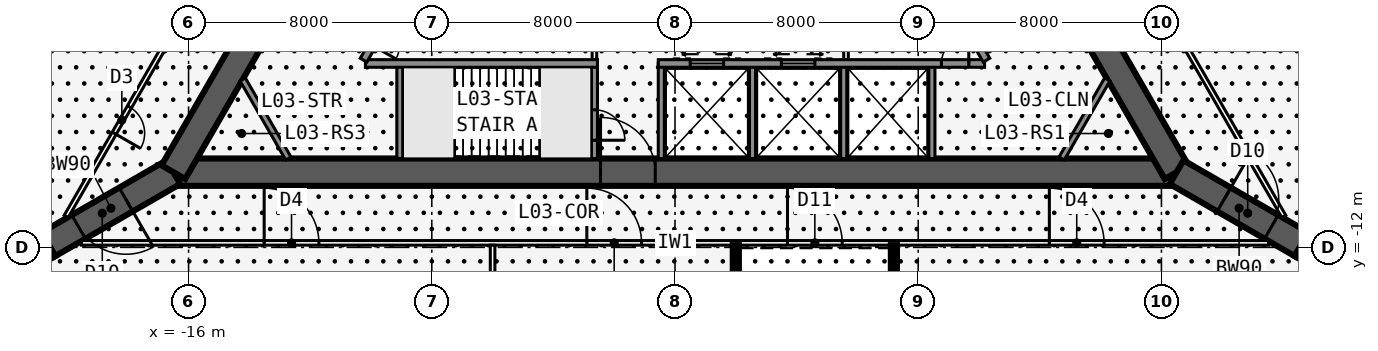
"""IFC4 building model, lengths in metres.
Left out: names, types, materials, properties, quantities, classifications, styles, units other than length and angle.
Written with IfcOpenShell. Run it as: python <this file> out.ifc"""

import sys

from ifc_helpers import new_model, si_unit, direction, frame, frame_2d, origin, place, context, subcontext, project, spatial, rectangle, extrude, element, fill, save


model = new_model("IFC4")
c1 = context("Model", 3, precision=1e-05, world=origin(), true_north=direction((0.0, 1.0)))
c2 = subcontext(c1, "Body", "Model", "MODEL_VIEW")
j1 = project(units=[si_unit("LENGTHUNIT", "METRE"), si_unit("PLANEANGLEUNIT", "RADIAN")], contexts=[c1])
p1 = place(None, origin())
s1 = spatial("IfcSite", under=j1, at=p1, CompositionType="ELEMENT")
p2 = place(p1, origin())
s2 = spatial("IfcBuilding", under=s1, at=p2, CompositionType="ELEMENT")
p3 = place(p2, frame((0.0, 0.0, 17.5)))
s3 = spatial("IfcBuildingStorey", under=s2, at=p3, CompositionType="ELEMENT", Elevation=17.5)
p4 = place(p3, frame((-16.5, -9.526, 0.0), z_axis=(0.0, 0.0, 1.0), x_axis=(1.0, 0.0, 0.0)))
e1 = element("IfcWall", 1, at=p4, inside=s3, PredefinedType="SHEAR", context=c2, shape_type="SweptSolid", body=[
    extrude(rectangle(XDim=33.0, YDim=0.9, at=frame_2d((16.5, 0.0))), origin(), (0.0, 0.0, 1.0), 5.0),
])
p5 = place(p4, frame((14.05, 0.0, 0.0)))
e2 = element("IfcOpeningElement", 2, at=p5, cuts=e1, PredefinedType="OPENING", context=c2, shape_type="SweptSolid", body=[
    extrude(rectangle(XDim=1.8, YDim=2.13, at=frame_2d((0.9, 1.065))), frame((0.0, 0.46, 0.0), z_axis=(0.0, -1.0, 0.0), x_axis=(1.0, 0.0, 0.0)), (0.0, 0.0, 1.0), 0.92),
])
p6 = place(p3, frame((-10.183, -5.951, 0.0), z_axis=(0.0, 0.0, 1.0), x_axis=(1.0, 0.0, 0.0)))
e3 = element("IfcWall", 3, at=p6, inside=s3, PredefinedType="SOLIDWALL", context=c2, shape_type="SweptSolid", body=[
    extrude(rectangle(XDim=7.633, YDim=0.25, at=frame_2d((3.816, 0.0))), origin(), (0.0, 0.0, 1.0), 4.75),
])
p7 = place(p3, frame((-0.55, -5.951, 0.0), z_axis=(0.0, 0.0, 1.0), x_axis=(1.0, 0.0, 0.0)))
e4 = element("IfcWall", 4, at=p7, inside=s3, PredefinedType="SOLIDWALL", context=c2, shape_type="SweptSolid", body=[
    extrude(rectangle(XDim=10.733, YDim=0.25, at=frame_2d((5.366, 0.0))), origin(), (0.0, 0.0, 1.0), 4.75),
])
p8 = place(p7, frame((9.314, 0.0, 0.0)))
e5 = element("IfcOpeningElement", 5, at=p8, cuts=e4, PredefinedType="OPENING", context=c2, shape_type="SweptSolid", body=[
    extrude(rectangle(XDim=0.9, YDim=2.13, at=frame_2d((0.45, 1.065))), frame((0.0, 0.135, 0.0), z_axis=(0.0, -1.0, 0.0), x_axis=(1.0, 0.0, 0.0)), (0.0, 0.0, 1.0), 0.27),
])
p9 = place(p7, frame((1.05, 0.0, 0.0)))
e6 = element("IfcOpeningElement", 6, at=p9, cuts=e4, PredefinedType="OPENING", context=c2, shape_type="SweptSolid", body=[
    extrude(rectangle(XDim=1.1, YDim=2.13, at=frame_2d((0.55, 1.065))), frame((0.0, 0.135, 0.0), z_axis=(0.0, -1.0, 0.0), x_axis=(1.0, 0.0, 0.0)), (0.0, 0.0, 1.0), 0.27),
])
p10 = place(p7, frame((4.05, 0.0, 0.0)))
e7 = element("IfcOpeningElement", 7, at=p10, cuts=e4, PredefinedType="OPENING", context=c2, shape_type="SweptSolid", body=[
    extrude(rectangle(XDim=1.1, YDim=2.13, at=frame_2d((0.55, 1.065))), frame((0.0, 0.135, 0.0), z_axis=(0.0, -1.0, 0.0), x_axis=(1.0, 0.0, 0.0)), (0.0, 0.0, 1.0), 0.27),
])
p11 = place(p3, frame((-9.05, -5.951, 0.0), z_axis=(0.0, 0.0, 1.0), x_axis=(0.0, -1.0, 0.0)))
e8 = element("IfcWall", 8, at=p11, inside=s3, PredefinedType="SOLIDWALL", context=c2, shape_type="SweptSolid", body=[
    extrude(rectangle(XDim=3.125, YDim=0.2, at=frame_2d((1.562, 0.0))), origin(), (0.0, 0.0, 1.0), 4.75),
])
p12 = place(p3, frame((-2.65, -5.951, 0.0), z_axis=(0.0, 0.0, 1.0), x_axis=(0.0, -1.0, 0.0)))
e9 = element("IfcWall", 9, at=p12, inside=s3, PredefinedType="SOLIDWALL", context=c2, shape_type="SweptSolid", body=[
    extrude(rectangle(XDim=3.125, YDim=0.2, at=frame_2d((1.562, 0.0))), origin(), (0.0, 0.0, 1.0), 4.75),
])
p13 = place(p12, frame((1.525, 0.0, 0.0)))
e10 = element("IfcOpeningElement", 10, at=p13, cuts=e9, PredefinedType="OPENING", context=c2, shape_type="SweptSolid", body=[
    extrude(rectangle(XDim=1.0, YDim=2.13, at=frame_2d((0.5, 1.065))), frame((0.0, 0.11, 0.0), z_axis=(0.0, -1.0, 0.0), x_axis=(1.0, 0.0, 0.0)), (0.0, 0.0, 1.0), 0.22),
])
for number, where, z_axis, x_axis in (
    (11, (-0.45, -5.951, 0.0), (0.0, 0.0, 1.0), (0.0, -1.0, 0.0)),
    (12, (2.55, -5.951, 0.0), (0.0, 0.0, 1.0), (0.0, -1.0, 0.0)),
    (13, (5.55, -5.951, 0.0), (0.0, 0.0, 1.0), (0.0, -1.0, 0.0)),
    (14, (8.45, -5.951, 0.0), (0.0, 0.0, 1.0), (0.0, -1.0, 0.0)),
):
    element("IfcWall", number, at=place(p3, frame(where, z_axis=z_axis, x_axis=x_axis)), inside=s3, PredefinedType="SOLIDWALL", context=c2, shape_type="SweptSolid", body=[
        extrude(rectangle(XDim=3.125, YDim=0.2, at=frame_2d((1.562, 0.0))), origin(), (0.0, 0.0, 1.0), 4.75),
    ])
p14 = place(p3, frame((16.5, -9.526, 0.0), z_axis=(0.0, 0.0, 1.0), x_axis=(-0.499999749417, 0.866025548458, 0.0)))
e15 = element("IfcWall", 15, at=p14, inside=s3, PredefinedType="SHEAR", context=c2, shape_type="SweptSolid", body=[
    extrude(rectangle(XDim=33.0, YDim=0.9, at=frame_2d((16.5, 0.0))), origin(), (0.0, 0.0, 1.0), 5.0),
])
p15 = place(p14, frame((14.15, 0.0, 0.0)))
e16 = element("IfcOpeningElement", 16, at=p15, cuts=e15, PredefinedType="OPENING", context=c2, shape_type="SweptSolid", body=[
    extrude(rectangle(XDim=1.8, YDim=2.13, at=frame_2d((0.9, 1.065))), frame((0.0, 0.46, 0.0), z_axis=(0.0, -1.0, 0.0), x_axis=(1.0, 0.0, 0.0)), (0.0, 0.0, 1.0), 0.92),
])
p16 = place(p14, frame((12.6, 0.0, 0.0)))
e17 = element("IfcOpeningElement", 17, at=p16, cuts=e15, PredefinedType="OPENING", context=c2, shape_type="SweptSolid", body=[
    extrude(rectangle(XDim=1.0, YDim=2.13, at=frame_2d((0.5, 1.065))), frame((0.0, 0.46, 0.0), z_axis=(0.0, -1.0, 0.0), x_axis=(1.0, 0.0, 0.0)), (0.0, 0.0, 1.0), 0.92),
])
p17 = place(p3, frame((10.245, -5.843, 0.0), z_axis=(0.0, 0.0, 1.0), x_axis=(-0.499993009313, 0.866029439822, 0.0)))
e18 = element("IfcWall", 18, at=p17, inside=s3, PredefinedType="SOLIDWALL", context=c2, shape_type="SweptSolid", body=[
    extrude(rectangle(XDim=7.733, YDim=0.25, at=frame_2d((3.866, 0.0))), origin(), (0.0, 0.0, 1.0), 4.75),
])
p18 = place(p3, frame((0.0, 19.052, 0.0), z_axis=(0.0, 0.0, 1.0), x_axis=(-0.499999749417, -0.866025548458, 0.0)))
e19 = element("IfcWall", 19, at=p18, inside=s3, PredefinedType="SHEAR", context=c2, shape_type="SweptSolid", body=[
    extrude(rectangle(XDim=33.0, YDim=0.9, at=frame_2d((16.5, 0.0))), origin(), (0.0, 0.0, 1.0), 5.0),
])
p19 = place(p18, frame((14.15, 0.0, 0.0)))
e20 = element("IfcOpeningElement", 20, at=p19, cuts=e19, PredefinedType="OPENING", context=c2, shape_type="SweptSolid", body=[
    extrude(rectangle(XDim=1.8, YDim=2.13, at=frame_2d((0.9, 1.065))), frame((0.0, 0.46, 0.0), z_axis=(0.0, -1.0, 0.0), x_axis=(1.0, 0.0, 0.0)), (0.0, 0.0, 1.0), 0.92),
])
p20 = place(p18, frame((12.6, 0.0, 0.0)))
e21 = element("IfcOpeningElement", 21, at=p20, cuts=e19, PredefinedType="OPENING", context=c2, shape_type="SweptSolid", body=[
    extrude(rectangle(XDim=1.0, YDim=2.13, at=frame_2d((0.5, 1.065))), frame((0.0, 0.46, 0.0), z_axis=(0.0, -1.0, 0.0), x_axis=(1.0, 0.0, 0.0)), (0.0, 0.0, 1.0), 0.92),
])
p21 = place(p3, frame((-4.929, 3.365, 0.0), z_axis=(0.0, 0.0, 1.0), x_axis=(-0.499991433582, -0.866030349552, 0.0)))
e22 = element("IfcWall", 22, at=p21, inside=s3, PredefinedType="SOLIDWALL", context=c2, shape_type="SweptSolid", body=[
    extrude(rectangle(XDim=10.633, YDim=0.25, at=frame_2d((5.316, 0.0))), origin(), (0.0, 0.0, 1.0), 4.75),
])
p22 = place(p21, frame((9.164, 0.0, 0.0)))
e23 = element("IfcOpeningElement", 23, at=p22, cuts=e22, PredefinedType="OPENING", context=c2, shape_type="SweptSolid", body=[
    extrude(rectangle(XDim=0.9, YDim=2.13, at=frame_2d((0.45, 1.065))), frame((0.0, 0.135, 0.0), z_axis=(0.0, -1.0, 0.0), x_axis=(1.0, 0.0, 0.0)), (0.0, 0.0, 1.0), 0.27),
])
p23 = place(p3, frame((16.5, -9.526, 0.0), z_axis=(0.0, 0.0, 1.0), x_axis=(0.866031398331, -0.499989616998, 0.0)))
e24 = element("IfcWall", 24, at=p23, inside=s3, PredefinedType="SHEAR", context=c2, shape_type="SweptSolid", body=[
    extrude(rectangle(XDim=4.746, YDim=0.9, at=frame_2d((2.373, 0.0))), origin(), (0.0, 0.0, 1.0), 5.0),
])
p24 = place(p23, frame((1.8, 0.0, 0.0)))
e25 = element("IfcOpeningElement", 25, at=p24, cuts=e24, PredefinedType="OPENING", context=c2, shape_type="SweptSolid", body=[
    extrude(rectangle(XDim=1.8, YDim=2.13, at=frame_2d((0.9, 1.065))), frame((0.0, 0.46, 0.0), z_axis=(0.0, -1.0, 0.0), x_axis=(1.0, 0.0, 0.0)), (0.0, 0.0, 1.0), 0.92),
])
p25 = place(p3, frame((20.61, -11.899, 0.0), z_axis=(0.0, 0.0, 1.0), x_axis=(0.866009537788, -0.500027479704, 0.0)))
e26 = element("IfcWall", 26, at=p25, inside=s3, PredefinedType="SHEAR", context=c2, shape_type="SweptSolid", body=[
    extrude(rectangle(XDim=1.155, YDim=0.9, at=frame_2d((0.577, 0.0))), origin(), (0.0, 0.0, 1.0), 5.0),
])
p26 = place(p3, frame((-16.5, -9.526, 0.0), z_axis=(0.0, 0.0, 1.0), x_axis=(-0.866031398331, -0.499989616998, 0.0)))
e27 = element("IfcWall", 27, at=p26, inside=s3, PredefinedType="SHEAR", context=c2, shape_type="SweptSolid", body=[
    extrude(rectangle(XDim=4.746, YDim=0.9, at=frame_2d((2.373, 0.0))), origin(), (0.0, 0.0, 1.0), 5.0),
])
p27 = place(p26, frame((1.8, 0.0, 0.0)))
e28 = element("IfcOpeningElement", 28, at=p27, cuts=e27, PredefinedType="OPENING", context=c2, shape_type="SweptSolid", body=[
    extrude(rectangle(XDim=1.8, YDim=2.13, at=frame_2d((0.9, 1.065))), frame((0.0, 0.46, 0.0), z_axis=(0.0, -1.0, 0.0), x_axis=(1.0, 0.0, 0.0)), (0.0, 0.0, 1.0), 0.92),
])
p28 = place(p3, frame((-20.61, -11.899, 0.0), z_axis=(0.0, 0.0, 1.0), x_axis=(-0.866009537788, -0.500027479704, 0.0)))
e29 = element("IfcWall", 29, at=p28, inside=s3, PredefinedType="SHEAR", context=c2, shape_type="SweptSolid", body=[
    extrude(rectangle(XDim=1.155, YDim=0.9, at=frame_2d((0.577, 0.0))), origin(), (0.0, 0.0, 1.0), 5.0),
])
p29 = place(p3, frame((-19.527, -11.851, 0.0), z_axis=(0.0, 0.0, 1.0), x_axis=(1.0, 0.0, 0.0)))
e30 = element("IfcWall", 30, at=p29, inside=s3, PredefinedType="PARTITIONING", context=c2, shape_type="SweptSolid", body=[
    extrude(rectangle(XDim=39.054, YDim=0.15, at=frame_2d((19.527, 0.0))), origin(), (0.0, 0.0, 1.0), 4.75),
])
p30 = place(p29, frame((6.013, 0.0, 0.0)))
e31 = element("IfcOpeningElement", 31, at=p30, cuts=e30, PredefinedType="OPENING", context=c2, shape_type="SweptSolid", body=[
    extrude(rectangle(XDim=1.8, YDim=2.13, at=frame_2d((0.9, 1.065))), frame((0.0, 0.085, 0.0), z_axis=(0.0, -1.0, 0.0), x_axis=(1.0, 0.0, 0.0)), (0.0, 0.0, 1.0), 0.17),
])
p31 = place(p29, frame((16.627, 0.0, 0.0)))
e32 = element("IfcOpeningElement", 32, at=p31, cuts=e30, PredefinedType="OPENING", context=c2, shape_type="SweptSolid", body=[
    extrude(rectangle(XDim=1.8, YDim=2.13, at=frame_2d((0.9, 1.065))), frame((0.0, 0.085, 0.0), z_axis=(0.0, -1.0, 0.0), x_axis=(1.0, 0.0, 0.0)), (0.0, 0.0, 1.0), 0.17),
])
p32 = place(p29, frame((23.227, 0.0, 0.0)))
e33 = element("IfcOpeningElement", 33, at=p32, cuts=e30, PredefinedType="OPENING", context=c2, shape_type="SweptSolid", body=[
    extrude(rectangle(XDim=1.8, YDim=2.13, at=frame_2d((0.9, 1.065))), frame((0.0, 0.085, 0.0), z_axis=(0.0, -1.0, 0.0), x_axis=(1.0, 0.0, 0.0)), (0.0, 0.0, 1.0), 0.17),
])
p33 = place(p29, frame((31.841, 0.0, 0.0)))
e34 = element("IfcOpeningElement", 34, at=p33, cuts=e30, PredefinedType="OPENING", context=c2, shape_type="SweptSolid", body=[
    extrude(rectangle(XDim=1.8, YDim=2.13, at=frame_2d((0.9, 1.065))), frame((0.0, 0.085, 0.0), z_axis=(0.0, -1.0, 0.0), x_axis=(1.0, 0.0, 0.0)), (0.0, 0.0, 1.0), 0.17),
])
p34 = place(p3, frame((-6.0, -11.926, 0.0), z_axis=(0.0, 0.0, 1.0), x_axis=(0.0, -1.0, 0.0)))
e35 = element("IfcWall", 35, at=p34, inside=s3, PredefinedType="PARTITIONING", context=c2, shape_type="SweptSolid", body=[
    extrude(rectangle(XDim=10.455, YDim=0.15, at=frame_2d((5.228, 0.0))), origin(), (0.0, 0.0, 1.0), 4.75),
])
p35 = place(p3, frame((2.0, -11.926, 0.0), z_axis=(0.0, 0.0, 1.0), x_axis=(0.0, -1.0, 0.0)))
e36 = element("IfcWall", 36, at=p35, inside=s3, PredefinedType="SHEAR", context=c2, shape_type="SweptSolid", body=[
    extrude(rectangle(XDim=10.596, YDim=0.2, at=frame_2d((5.298, 0.0))), origin(), (0.0, 0.0, 1.0), 5.0),
])
p36 = place(p3, frame((7.2, -11.926, 0.0), z_axis=(0.0, 0.0, 1.0), x_axis=(0.0, -1.0, 0.0)))
e37 = element("IfcWall", 37, at=p36, inside=s3, PredefinedType="SHEAR", context=c2, shape_type="SweptSolid", body=[
    extrude(rectangle(XDim=10.502, YDim=0.2, at=frame_2d((5.251, 0.0))), origin(), (0.0, 0.0, 1.0), 5.0),
])
p37 = place(p3, frame((20.027, -10.985, 0.0), z_axis=(0.0, 0.0, 1.0), x_axis=(-0.500001677587, 0.866024435227, 0.0)))
e38 = element("IfcWall", 38, at=p37, inside=s3, PredefinedType="PARTITIONING", context=c2, shape_type="SweptSolid", body=[
    extrude(rectangle(XDim=39.054, YDim=0.15, at=frame_2d((19.527, 0.0))), origin(), (0.0, 0.0, 1.0), 4.75),
])
p38 = place(p37, frame((10.013, 0.0, 0.0)))
e39 = element("IfcOpeningElement", 39, at=p38, cuts=e38, PredefinedType="OPENING", context=c2, shape_type="SweptSolid", body=[
    extrude(rectangle(XDim=1.8, YDim=2.13, at=frame_2d((0.9, 1.065))), frame((0.0, 0.085, 0.0), z_axis=(0.0, -1.0, 0.0), x_axis=(1.0, 0.0, 0.0)), (0.0, 0.0, 1.0), 0.17),
])
p39 = place(p37, frame((23.227, 0.0, 0.0)))
e40 = element("IfcOpeningElement", 40, at=p39, cuts=e38, PredefinedType="OPENING", context=c2, shape_type="SweptSolid", body=[
    extrude(rectangle(XDim=1.8, YDim=2.13, at=frame_2d((0.9, 1.065))), frame((0.0, 0.085, 0.0), z_axis=(0.0, -1.0, 0.0), x_axis=(1.0, 0.0, 0.0)), (0.0, 0.0, 1.0), 0.17),
])
p40 = place(p37, frame((27.627, 0.0, 0.0)))
e41 = element("IfcOpeningElement", 41, at=p40, cuts=e38, PredefinedType="OPENING", context=c2, shape_type="SweptSolid", body=[
    extrude(rectangle(XDim=1.0, YDim=2.13, at=frame_2d((0.5, 1.065))), frame((0.0, 0.085, 0.0), z_axis=(0.0, -1.0, 0.0), x_axis=(1.0, 0.0, 0.0)), (0.0, 0.0, 1.0), 0.17),
])
p41 = place(p37, frame((30.527, 0.0, 0.0)))
e42 = element("IfcOpeningElement", 42, at=p41, cuts=e38, PredefinedType="OPENING", context=c2, shape_type="SweptSolid", body=[
    extrude(rectangle(XDim=1.0, YDim=2.13, at=frame_2d((0.5, 1.065))), frame((0.0, 0.085, 0.0), z_axis=(0.0, -1.0, 0.0), x_axis=(1.0, 0.0, 0.0)), (0.0, 0.0, 1.0), 0.17),
])
p42 = place(p37, frame((33.277, 0.0, 0.0)))
e43 = element("IfcOpeningElement", 43, at=p42, cuts=e38, PredefinedType="OPENING", context=c2, shape_type="SweptSolid", body=[
    extrude(rectangle(XDim=1.0, YDim=2.13, at=frame_2d((0.5, 1.065))), frame((0.0, 0.085, 0.0), z_axis=(0.0, -1.0, 0.0), x_axis=(1.0, 0.0, 0.0)), (0.0, 0.0, 1.0), 0.17),
])
p43 = place(p37, frame((36.39, 0.0, 0.0)))
e44 = element("IfcOpeningElement", 44, at=p43, cuts=e38, PredefinedType="OPENING", context=c2, shape_type="SweptSolid", body=[
    extrude(rectangle(XDim=1.0, YDim=2.13, at=frame_2d((0.5, 1.065))), frame((0.0, 0.085, 0.0), z_axis=(0.0, -1.0, 0.0), x_axis=(1.0, 0.0, 0.0)), (0.0, 0.0, 1.0), 0.17),
])
p44 = place(p3, frame((-0.5, 22.836, 0.0), z_axis=(0.0, 0.0, 1.0), x_axis=(-0.500001677587, -0.866024435227, 0.0)))
e45 = element("IfcWall", 45, at=p44, inside=s3, PredefinedType="PARTITIONING", context=c2, shape_type="SweptSolid", body=[
    extrude(rectangle(XDim=39.054, YDim=0.15, at=frame_2d((19.527, 0.0))), origin(), (0.0, 0.0, 1.0), 4.75),
])
p45 = place(p44, frame((10.414, 0.0, 0.0)))
e46 = element("IfcOpeningElement", 46, at=p45, cuts=e45, PredefinedType="OPENING", context=c2, shape_type="SweptSolid", body=[
    extrude(rectangle(XDim=1.0, YDim=2.13, at=frame_2d((0.5, 1.065))), frame((0.0, 0.085, 0.0), z_axis=(0.0, -1.0, 0.0), x_axis=(1.0, 0.0, 0.0)), (0.0, 0.0, 1.0), 0.17),
])
p46 = place(p44, frame((23.227, 0.0, 0.0)))
e47 = element("IfcOpeningElement", 47, at=p46, cuts=e45, PredefinedType="OPENING", context=c2, shape_type="SweptSolid", body=[
    extrude(rectangle(XDim=1.8, YDim=2.13, at=frame_2d((0.9, 1.065))), frame((0.0, 0.085, 0.0), z_axis=(0.0, -1.0, 0.0), x_axis=(1.0, 0.0, 0.0)), (0.0, 0.0, 1.0), 0.17),
])
p47 = place(p44, frame((27.627, 0.0, 0.0)))
e48 = element("IfcOpeningElement", 48, at=p47, cuts=e45, PredefinedType="OPENING", context=c2, shape_type="SweptSolid", body=[
    extrude(rectangle(XDim=1.0, YDim=2.13, at=frame_2d((0.5, 1.065))), frame((0.0, 0.085, 0.0), z_axis=(0.0, -1.0, 0.0), x_axis=(1.0, 0.0, 0.0)), (0.0, 0.0, 1.0), 0.17),
])
p48 = place(p44, frame((30.277, 0.0, 0.0)))
e49 = element("IfcOpeningElement", 49, at=p48, cuts=e45, PredefinedType="OPENING", context=c2, shape_type="SweptSolid", body=[
    extrude(rectangle(XDim=1.0, YDim=2.13, at=frame_2d((0.5, 1.065))), frame((0.0, 0.085, 0.0), z_axis=(0.0, -1.0, 0.0), x_axis=(1.0, 0.0, 0.0)), (0.0, 0.0, 1.0), 0.17),
])
p49 = place(p44, frame((34.89, 0.0, 0.0)))
e50 = element("IfcOpeningElement", 50, at=p49, cuts=e45, PredefinedType="OPENING", context=c2, shape_type="SweptSolid", body=[
    extrude(rectangle(XDim=1.0, YDim=2.13, at=frame_2d((0.5, 1.065))), frame((0.0, 0.085, 0.0), z_axis=(0.0, -1.0, 0.0), x_axis=(1.0, 0.0, 0.0)), (0.0, 0.0, 1.0), 0.17),
])
for number, where, z_axis, x_axis in (
    (51, (-2.65, -5.826, 0.0), (0.0, 0.0, 1.0), (0.0, 1.0, 0.0)),
    (52, (5.625, -5.826, 0.0), (0.0, 0.0, 1.0), (0.0, 1.0, 0.0)),
):
    element("IfcWall", number, at=place(p3, frame(where, z_axis=z_axis, x_axis=x_axis)), inside=s3, PredefinedType="PARTITIONING", context=c2, shape_type="SweptSolid", body=[
        extrude(rectangle(XDim=2.5, YDim=0.15, at=frame_2d((1.25, 0.0))), origin(), (0.0, 0.0, 1.0), 4.75),
    ])
for number, where, z_axis, x_axis in (
    (53, (14.219, -6.476, 0.0), (0.0, 0.0, 1.0), (-0.5, -0.866, 0.0)),
    (54, (-12.719, -9.076, 0.0), (0.0, 0.0, 1.0), (-0.5, 0.866, 0.0)),
):
    element("IfcWall", number, at=place(p3, frame(where, z_axis=z_axis, x_axis=x_axis)), inside=s3, PredefinedType="SOLIDWALL", context=c2, shape_type="SweptSolid", body=[
        extrude(rectangle(XDim=3.002, YDim=0.2, at=frame_2d((1.501, 0.0))), origin(), (0.0, 0.0, 1.0), 4.75),
    ])
p50 = place(p3, frame((-7.247, -7.576, 0.0), z_axis=(0.0, 0.0, 1.0), x_axis=(1.0, 0.0, 0.0)))
e55 = element("IfcWall", 55, at=p50, inside=s3, PredefinedType="SOLIDWALL", context=c2, shape_type="SweptSolid", body=[
    extrude(rectangle(XDim=2.794, YDim=0.1, at=frame_2d((1.397, 0.0))), origin(), (0.0, 0.0, 1.0), 5.0),
])
p51 = place(p30, origin())
e56 = element("IfcDoor", 56, at=p51, inside=s3, OperationType="DOUBLE_DOOR_SINGLE_SWING", PredefinedType="DOOR", context=c2, shape_type="SweptSolid", body=[
    extrude(rectangle(XDim=1.8, YDim=2.13, at=frame_2d((0.9, 1.065))), frame((0.0, 0.025, 0.0), z_axis=(0.0, -1.0, 0.0), x_axis=(1.0, 0.0, 0.0)), (0.0, 0.0, 1.0), 0.05),
])
fill(e31, e56)
p52 = place(p31, origin())
e57 = element("IfcDoor", 57, at=p52, inside=s3, OperationType="DOUBLE_DOOR_SINGLE_SWING", PredefinedType="DOOR", context=c2, shape_type="SweptSolid", body=[
    extrude(rectangle(XDim=1.8, YDim=2.13, at=frame_2d((0.9, 1.065))), frame((0.0, 0.025, 0.0), z_axis=(0.0, -1.0, 0.0), x_axis=(1.0, 0.0, 0.0)), (0.0, 0.0, 1.0), 0.05),
])
fill(e32, e57)
p53 = place(p32, origin())
e58 = element("IfcDoor", 58, at=p53, inside=s3, OperationType="DOUBLE_DOOR_SINGLE_SWING", PredefinedType="DOOR", context=c2, shape_type="SweptSolid", body=[
    extrude(rectangle(XDim=1.8, YDim=2.13, at=frame_2d((0.9, 1.065))), frame((0.0, 0.025, 0.0), z_axis=(0.0, -1.0, 0.0), x_axis=(1.0, 0.0, 0.0)), (0.0, 0.0, 1.0), 0.05),
])
fill(e33, e58)
p54 = place(p33, origin())
e59 = element("IfcDoor", 59, at=p54, inside=s3, OperationType="DOUBLE_DOOR_SINGLE_SWING", PredefinedType="DOOR", context=c2, shape_type="SweptSolid", body=[
    extrude(rectangle(XDim=1.8, YDim=2.13, at=frame_2d((0.9, 1.065))), frame((0.0, 0.025, 0.0), z_axis=(0.0, -1.0, 0.0), x_axis=(1.0, 0.0, 0.0)), (0.0, 0.0, 1.0), 0.05),
])
fill(e34, e59)
p55 = place(p49, origin())
e60 = element("IfcDoor", 60, at=p55, inside=s3, OperationType="SINGLE_SWING_RIGHT", PredefinedType="DOOR", context=c2, shape_type="SweptSolid", body=[
    extrude(rectangle(XDim=1.0, YDim=2.13, at=frame_2d((0.5, 1.065))), frame((0.0, 0.025, 0.0), z_axis=(0.0, -1.0, 0.0), x_axis=(1.0, 0.0, 0.0)), (0.0, 0.0, 1.0), 0.05),
])
fill(e50, e60)
p56 = place(p5, origin())
e61 = element("IfcDoor", 61, at=p56, inside=s3, OperationType="DOUBLE_DOOR_SINGLE_SWING", PredefinedType="DOOR", context=c2, shape_type="SweptSolid", body=[
    extrude(rectangle(XDim=1.8, YDim=2.13, at=frame_2d((0.9, 1.065))), frame((0.0, 0.025, 0.0), z_axis=(0.0, -1.0, 0.0), x_axis=(1.0, 0.0, 0.0)), (0.0, 0.0, 1.0), 0.05),
])
fill(e2, e61)
p57 = place(p13, origin())
e62 = element("IfcDoor", 62, at=p57, inside=s3, OperationType="SINGLE_SWING_RIGHT", PredefinedType="DOOR", context=c2, shape_type="SweptSolid", body=[
    extrude(rectangle(XDim=1.0, YDim=2.13, at=frame_2d((0.5, 1.065))), frame((0.0, 0.025, 0.0), z_axis=(0.0, -1.0, 0.0), x_axis=(1.0, 0.0, 0.0)), (0.0, 0.0, 1.0), 0.05),
])
fill(e10, e62)
p58 = place(p24, origin())
e63 = element("IfcDoor", 63, at=p58, inside=s3, OperationType="DOUBLE_DOOR_DOUBLE_SWING", PredefinedType="DOOR", context=c2, shape_type="SweptSolid", body=[
    extrude(rectangle(XDim=1.8, YDim=2.13, at=frame_2d((0.9, 1.065))), frame((0.0, 0.025, 0.0), z_axis=(0.0, -1.0, 0.0), x_axis=(1.0, 0.0, 0.0)), (0.0, 0.0, 1.0), 0.05),
])
fill(e25, e63)
p59 = place(p27, origin())
e64 = element("IfcDoor", 64, at=p59, inside=s3, OperationType="DOUBLE_DOOR_DOUBLE_SWING", PredefinedType="DOOR", context=c2, shape_type="SweptSolid", body=[
    extrude(rectangle(XDim=1.8, YDim=2.13, at=frame_2d((0.9, 1.065))), frame((0.0, 0.025, 0.0), z_axis=(0.0, -1.0, 0.0), x_axis=(1.0, 0.0, 0.0)), (0.0, 0.0, 1.0), 0.05),
])
fill(e28, e64)
p60 = place(p8, origin())
e65 = element("IfcDoor", 65, at=p60, inside=s3, OperationType="SINGLE_SWING_RIGHT", PredefinedType="DOOR", context=c2, shape_type="SweptSolid", body=[
    extrude(rectangle(XDim=0.9, YDim=2.13, at=frame_2d((0.45, 1.065))), frame((0.0, 0.025, 0.0), z_axis=(0.0, -1.0, 0.0), x_axis=(1.0, 0.0, 0.0)), (0.0, 0.0, 1.0), 0.05),
])
fill(e5, e65)
p61 = place(p9, origin())
e66 = element("IfcDoor", 66, at=p61, inside=s3, OperationType="DOUBLE_DOOR_SLIDING", PredefinedType="USERDEFINED", context=c2, shape_type="SweptSolid", body=[
    extrude(rectangle(XDim=1.1, YDim=2.13, at=frame_2d((0.55, 1.065))), frame((0.0, 0.025, 0.0), z_axis=(0.0, -1.0, 0.0), x_axis=(1.0, 0.0, 0.0)), (0.0, 0.0, 1.0), 0.05),
])
fill(e6, e66)
p62 = place(p10, origin())
e67 = element("IfcDoor", 67, at=p62, inside=s3, OperationType="DOUBLE_DOOR_SLIDING", PredefinedType="USERDEFINED", context=c2, shape_type="SweptSolid", body=[
    extrude(rectangle(XDim=1.1, YDim=2.13, at=frame_2d((0.55, 1.065))), frame((0.0, 0.025, 0.0), z_axis=(0.0, -1.0, 0.0), x_axis=(1.0, 0.0, 0.0)), (0.0, 0.0, 1.0), 0.05),
])
fill(e7, e67)
save(model, sys.argv[1])
